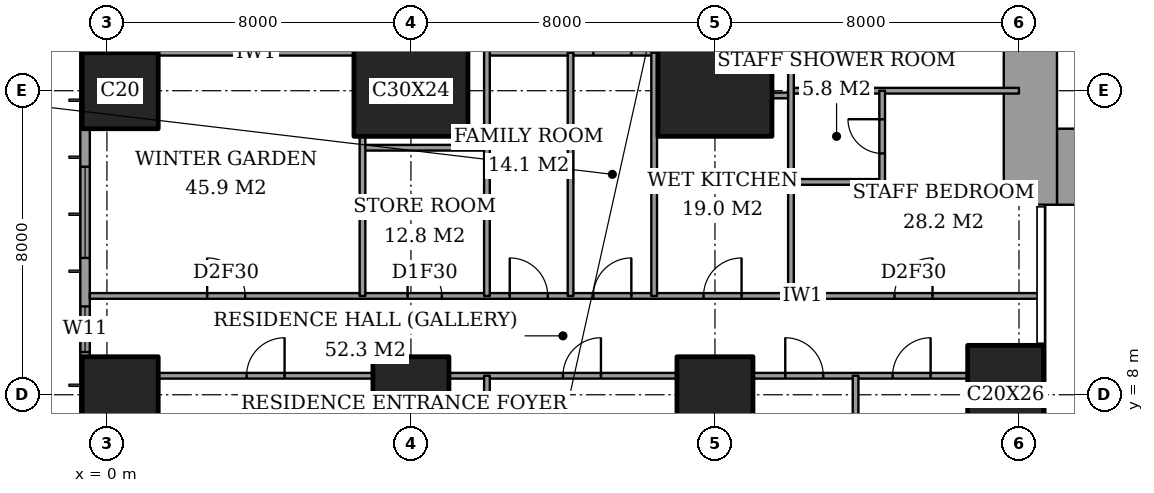
"""IFC4 building model, lengths in metres.
Left out: names, types, materials, properties, quantities, classifications, styles, units other than length and angle.
Written with IfcOpenShell. Run it as: python <this file> out.ifc"""

import sys

from ifc_helpers import new_model, si_unit, direction, frame, frame_2d, origin, origin_2d, place, context, subcontext, project, spatial, rectangle, extrude, element, fill, save


model = new_model("IFC4")
c1 = context("Model", 3, precision=1e-05, world=origin(), true_north=direction((0.0, 1.0)))
c2 = subcontext(c1, "Body", "Model", "MODEL_VIEW")
j1 = project(units=[si_unit("LENGTHUNIT", "METRE"), si_unit("PLANEANGLEUNIT", "RADIAN")], contexts=[c1])
p1 = place(None, origin())
s1 = spatial("IfcSite", under=j1, at=p1, CompositionType="ELEMENT")
p2 = place(p1, origin())
s2 = spatial("IfcBuilding", under=s1, at=p2, CompositionType="ELEMENT")
p3 = place(p2, frame((0.0, 0.0, 117.8)))
s3 = spatial("IfcBuildingStorey", under=s2, at=p3, CompositionType="ELEMENT", Elevation=117.8)
for number, where, z_axis, x_axis in (
    (1, (0.35, 8.0, 0.0), (0.0, 0.0, 1.0), (1.0, 0.0, 0.0)),
    (2, (0.35, 16.0, 0.0), (0.0, 0.0, 1.0), (1.0, 0.0, 0.0)),
    (3, (8.0, 8.0, 0.0), (0.0, 0.0, 1.0), (1.0, 0.0, 0.0)),
):
    element("IfcColumn", number, at=place(p3, frame(where, z_axis=z_axis, x_axis=x_axis)), inside=s3, PredefinedType="COLUMN", context=c2, shape_type="SweptSolid", body=[
        extrude(rectangle(XDim=2.0, YDim=2.0, at=origin_2d()), origin(), (0.0, 0.0, 1.0), 3.6),
    ])
p4 = place(p3, frame((8.0, 16.0, 0.0), z_axis=(0.0, 0.0, 1.0), x_axis=(1.0, 0.0, 0.0)))
e4 = element("IfcColumn", 4, at=p4, inside=s3, PredefinedType="COLUMN", context=c2, shape_type="SweptSolid", body=[
    extrude(rectangle(XDim=3.0, YDim=2.4, at=origin_2d()), origin(), (0.0, 0.0, 1.0), 3.6),
])
p5 = place(p3, frame((16.0, 8.0, 0.0), z_axis=(0.0, 0.0, 1.0), x_axis=(1.0, 0.0, 0.0)))
e5 = element("IfcColumn", 5, at=p5, inside=s3, PredefinedType="COLUMN", context=c2, shape_type="SweptSolid", body=[
    extrude(rectangle(XDim=2.0, YDim=2.0, at=origin_2d()), origin(), (0.0, 0.0, 1.0), 3.6),
])
p6 = place(p3, frame((16.0, 16.0, 0.0), z_axis=(0.0, 0.0, 1.0), x_axis=(1.0, 0.0, 0.0)))
e6 = element("IfcColumn", 6, at=p6, inside=s3, PredefinedType="COLUMN", context=c2, shape_type="SweptSolid", body=[
    extrude(rectangle(XDim=3.0, YDim=2.4, at=origin_2d()), origin(), (0.0, 0.0, 1.0), 3.6),
])
p7 = place(p3, frame((23.65, 8.0, 0.0), z_axis=(0.0, 0.0, 1.0), x_axis=(1.0, 0.0, 0.0)))
e7 = element("IfcColumn", 7, at=p7, inside=s3, PredefinedType="COLUMN", context=c2, shape_type="SweptSolid", body=[
    extrude(rectangle(XDim=2.0, YDim=2.6, at=origin_2d()), origin(), (0.0, 0.0, 1.0), 3.6),
])
p8 = place(p3, frame((25.0, 14.0, 0.0), z_axis=(0.0, 0.0, 1.0), x_axis=(1.0, 0.0, 0.0)))
e8 = element("IfcWall", 8, at=p8, inside=s3, PredefinedType="SHEAR", context=c2, shape_type="SweptSolid", body=[
    extrude(rectangle(XDim=3.15, YDim=2.0, at=frame_2d((1.575, 0.0))), origin(), (0.0, 0.0, 1.0), 3.6),
])
p9 = place(p3, frame((24.3, 13.0, 0.0), z_axis=(0.0, 0.0, 1.0), x_axis=(0.0, 1.0, 0.0)))
e9 = element("IfcWall", 9, at=p9, inside=s3, PredefinedType="SHEAR", context=c2, shape_type="SweptSolid", body=[
    extrude(rectangle(XDim=10.15, YDim=1.4, at=frame_2d((5.075, 0.0))), origin(), (0.0, 0.0, 1.0), 3.6),
])
p10 = place(p3, frame((-0.575, 44.825, 0.0), z_axis=(0.0, 0.0, 1.0), x_axis=(0.0, -1.0, 0.0)))
e10 = element("IfcWall", 10, at=p10, inside=s3, PredefinedType="SOLIDWALL", context=c2, shape_type="SweptSolid", body=[
    extrude(rectangle(XDim=41.65, YDim=0.25, at=frame_2d((20.825, 0.0))), origin(), (0.0, 0.0, 1.0), 3.6),
])
p11 = place(p10, frame((0.775, 0.0, 0.4)))
e11 = element("IfcOpeningElement", 11, at=p11, cuts=e10, PredefinedType="OPENING", context=c2, shape_type="SweptSolid", body=[
    extrude(rectangle(XDim=2.4, YDim=2.2, at=frame_2d((1.2, 1.1))), frame((0.0, 0.135, 0.0), z_axis=(0.0, -1.0, 0.0), x_axis=(1.0, 0.0, 0.0)), (0.0, 0.0, 1.0), 0.27),
])
p12 = place(p10, frame((6.1, 0.0, 0.4)))
e12 = element("IfcOpeningElement", 12, at=p12, cuts=e10, PredefinedType="OPENING", context=c2, shape_type="SweptSolid", body=[
    extrude(rectangle(XDim=1.2, YDim=2.2, at=frame_2d((0.6, 1.1))), frame((0.0, 0.135, 0.0), z_axis=(0.0, -1.0, 0.0), x_axis=(1.0, 0.0, 0.0)), (0.0, 0.0, 1.0), 0.27),
])
p13 = place(p10, frame((8.225, 0.0, 0.4)))
e13 = element("IfcOpeningElement", 13, at=p13, cuts=e10, PredefinedType="OPENING", context=c2, shape_type="SweptSolid", body=[
    extrude(rectangle(XDim=2.4, YDim=2.2, at=frame_2d((1.2, 1.1))), frame((0.0, 0.135, 0.0), z_axis=(0.0, -1.0, 0.0), x_axis=(1.0, 0.0, 0.0)), (0.0, 0.0, 1.0), 0.27),
])
p14 = place(p10, frame((15.625, 0.0, 0.4)))
e14 = element("IfcOpeningElement", 14, at=p14, cuts=e10, PredefinedType="OPENING", context=c2, shape_type="SweptSolid", body=[
    extrude(rectangle(XDim=2.4, YDim=2.2, at=frame_2d((1.2, 1.1))), frame((0.0, 0.135, 0.0), z_axis=(0.0, -1.0, 0.0), x_axis=(1.0, 0.0, 0.0)), (0.0, 0.0, 1.0), 0.27),
])
p15 = place(p10, frame((23.625, 0.0, 0.4)))
e15 = element("IfcOpeningElement", 15, at=p15, cuts=e10, PredefinedType="OPENING", context=c2, shape_type="SweptSolid", body=[
    extrude(rectangle(XDim=2.4, YDim=2.2, at=frame_2d((1.2, 1.1))), frame((0.0, 0.135, 0.0), z_axis=(0.0, -1.0, 0.0), x_axis=(1.0, 0.0, 0.0)), (0.0, 0.0, 1.0), 0.27),
])
p16 = place(p10, frame((30.825, 0.0, 0.4)))
e16 = element("IfcOpeningElement", 16, at=p16, cuts=e10, PredefinedType="OPENING", context=c2, shape_type="SweptSolid", body=[
    extrude(rectangle(XDim=2.4, YDim=2.2, at=frame_2d((1.2, 1.1))), frame((0.0, 0.135, 0.0), z_axis=(0.0, -1.0, 0.0), x_axis=(1.0, 0.0, 0.0)), (0.0, 0.0, 1.0), 0.27),
])
p17 = place(p10, frame((34.5, 0.0, 0.4)))
e17 = element("IfcOpeningElement", 17, at=p17, cuts=e10, PredefinedType="OPENING", context=c2, shape_type="SweptSolid", body=[
    extrude(rectangle(XDim=1.2, YDim=2.2, at=frame_2d((0.6, 1.1))), frame((0.0, 0.135, 0.0), z_axis=(0.0, -1.0, 0.0), x_axis=(1.0, 0.0, 0.0)), (0.0, 0.0, 1.0), 0.27),
])
p18 = place(p10, frame((38.475, 0.0, 0.4)))
e18 = element("IfcOpeningElement", 18, at=p18, cuts=e10, PredefinedType="OPENING", context=c2, shape_type="SweptSolid", body=[
    extrude(rectangle(XDim=2.4, YDim=2.2, at=frame_2d((1.2, 1.1))), frame((0.0, 0.135, 0.0), z_axis=(0.0, -1.0, 0.0), x_axis=(1.0, 0.0, 0.0)), (0.0, 0.0, 1.0), 0.27),
])
p19 = place(p3, frame((1.35, 8.5, 0.0), z_axis=(0.0, 0.0, 1.0), x_axis=(1.0, 0.0, 0.0)))
e19 = element("IfcWall", 19, at=p19, inside=s3, PredefinedType="PARTITIONING", context=c2, shape_type="SweptSolid", body=[
    extrude(rectangle(XDim=5.65, YDim=0.15, at=frame_2d((2.825, 0.0))), origin(), (0.0, 0.0, 1.0), 3.35),
])
p20 = place(p19, frame((2.325, 0.0, 0.0)))
e20 = element("IfcOpeningElement", 20, at=p20, cuts=e19, PredefinedType="OPENING", context=c2, shape_type="SweptSolid", body=[
    extrude(rectangle(XDim=1.0, YDim=2.1, at=frame_2d((0.5, 1.05))), frame((0.0, 0.085, 0.0), z_axis=(0.0, -1.0, 0.0), x_axis=(1.0, 0.0, 0.0)), (0.0, 0.0, 1.0), 0.17),
])
p21 = place(p3, frame((9.0, 8.5, 0.0), z_axis=(0.0, 0.0, 1.0), x_axis=(1.0, 0.0, 0.0)))
e21 = element("IfcWall", 21, at=p21, inside=s3, PredefinedType="PARTITIONING", context=c2, shape_type="SweptSolid", body=[
    extrude(rectangle(XDim=6.0, YDim=0.15, at=frame_2d((3.0, 0.0))), origin(), (0.0, 0.0, 1.0), 3.35),
])
p22 = place(p21, frame((3.0, 0.0, 0.0)))
e22 = element("IfcOpeningElement", 22, at=p22, cuts=e21, PredefinedType="OPENING", context=c2, shape_type="SweptSolid", body=[
    extrude(rectangle(XDim=1.0, YDim=2.1, at=frame_2d((0.5, 1.05))), frame((0.0, 0.085, 0.0), z_axis=(0.0, -1.0, 0.0), x_axis=(1.0, 0.0, 0.0)), (0.0, 0.0, 1.0), 0.17),
])
p23 = place(p3, frame((17.0, 8.5, 0.0), z_axis=(0.0, 0.0, 1.0), x_axis=(1.0, 0.0, 0.0)))
e23 = element("IfcWall", 23, at=p23, inside=s3, PredefinedType="PARTITIONING", context=c2, shape_type="SweptSolid", body=[
    extrude(rectangle(XDim=5.65, YDim=0.15, at=frame_2d((2.825, 0.0))), origin(), (0.0, 0.0, 1.0), 3.35),
])
p24 = place(p23, frame((0.85, 0.0, 0.0)))
e24 = element("IfcOpeningElement", 24, at=p24, cuts=e23, PredefinedType="OPENING", context=c2, shape_type="SweptSolid", body=[
    extrude(rectangle(XDim=1.0, YDim=2.1, at=frame_2d((0.5, 1.05))), frame((0.0, 0.085, 0.0), z_axis=(0.0, -1.0, 0.0), x_axis=(1.0, 0.0, 0.0)), (0.0, 0.0, 1.0), 0.17),
])
p25 = place(p23, frame((3.675, 0.0, 0.0)))
e25 = element("IfcOpeningElement", 25, at=p25, cuts=e23, PredefinedType="OPENING", context=c2, shape_type="SweptSolid", body=[
    extrude(rectangle(XDim=1.0, YDim=2.1, at=frame_2d((0.5, 1.05))), frame((0.0, 0.085, 0.0), z_axis=(0.0, -1.0, 0.0), x_axis=(1.0, 0.0, 0.0)), (0.0, 0.0, 1.0), 0.17),
])
p26 = place(p3, frame((-0.45, 10.6, 0.0), z_axis=(0.0, 0.0, 1.0), x_axis=(1.0, 0.0, 0.0)))
e26 = element("IfcWall", 26, at=p26, inside=s3, PredefinedType="PARTITIONING", context=c2, shape_type="SweptSolid", body=[
    extrude(rectangle(XDim=25.011, YDim=0.15, at=frame_2d((12.505, 0.0))), origin(), (0.0, 0.0, 1.0), 3.35),
])
p27 = place(p26, frame((13.25, 0.0, 0.0)))
e27 = element("IfcOpeningElement", 27, at=p27, cuts=e26, PredefinedType="OPENING", context=c2, shape_type="SweptSolid", body=[
    extrude(rectangle(XDim=1.0, YDim=2.1, at=frame_2d((0.5, 1.05))), frame((0.0, 0.085, 0.0), z_axis=(0.0, -1.0, 0.0), x_axis=(1.0, 0.0, 0.0)), (0.0, 0.0, 1.0), 0.17),
])
p28 = place(p26, frame((3.087, 0.0, 0.0)))
e28 = element("IfcOpeningElement", 28, at=p28, cuts=e26, PredefinedType="OPENING", context=c2, shape_type="SweptSolid", body=[
    extrude(rectangle(XDim=1.0, YDim=2.1, at=frame_2d((0.5, 1.05))), frame((0.0, 0.085, 0.0), z_axis=(0.0, -1.0, 0.0), x_axis=(1.0, 0.0, 0.0)), (0.0, 0.0, 1.0), 0.17),
])
p29 = place(p26, frame((8.363, 0.0, 0.0)))
e29 = element("IfcOpeningElement", 29, at=p29, cuts=e26, PredefinedType="OPENING", context=c2, shape_type="SweptSolid", body=[
    extrude(rectangle(XDim=0.9, YDim=2.1, at=frame_2d((0.45, 1.05))), frame((0.0, 0.085, 0.0), z_axis=(0.0, -1.0, 0.0), x_axis=(1.0, 0.0, 0.0)), (0.0, 0.0, 1.0), 0.17),
])
p30 = place(p26, frame((11.05, 0.0, 0.0)))
e30 = element("IfcOpeningElement", 30, at=p30, cuts=e26, PredefinedType="OPENING", context=c2, shape_type="SweptSolid", body=[
    extrude(rectangle(XDim=1.0, YDim=2.1, at=frame_2d((0.5, 1.05))), frame((0.0, 0.085, 0.0), z_axis=(0.0, -1.0, 0.0), x_axis=(1.0, 0.0, 0.0)), (0.0, 0.0, 1.0), 0.17),
])
p31 = place(p26, frame((16.15, 0.0, 0.0)))
e31 = element("IfcOpeningElement", 31, at=p31, cuts=e26, PredefinedType="OPENING", context=c2, shape_type="SweptSolid", body=[
    extrude(rectangle(XDim=1.0, YDim=2.1, at=frame_2d((0.5, 1.05))), frame((0.0, 0.085, 0.0), z_axis=(0.0, -1.0, 0.0), x_axis=(1.0, 0.0, 0.0)), (0.0, 0.0, 1.0), 0.17),
])
p32 = place(p26, frame((21.175, 0.0, 0.0)))
e32 = element("IfcOpeningElement", 32, at=p32, cuts=e26, PredefinedType="OPENING", context=c2, shape_type="SweptSolid", body=[
    extrude(rectangle(XDim=1.0, YDim=2.1, at=frame_2d((0.5, 1.05))), frame((0.0, 0.085, 0.0), z_axis=(0.0, -1.0, 0.0), x_axis=(1.0, 0.0, 0.0)), (0.0, 0.0, 1.0), 0.17),
])
p33 = place(p3, frame((18.0, 13.6, 0.0), z_axis=(0.0, 0.0, 1.0), x_axis=(1.0, 0.0, 0.0)))
e33 = element("IfcWall", 33, at=p33, inside=s3, PredefinedType="PARTITIONING", context=c2, shape_type="SweptSolid", body=[
    extrude(rectangle(XDim=2.4, YDim=0.15, at=frame_2d((1.2, 0.0))), origin(), (0.0, 0.0, 1.0), 3.35),
])
p34 = place(p3, frame((6.725, 14.5, 0.0), z_axis=(0.0, 0.0, 1.0), x_axis=(1.0, 0.0, 0.0)))
e34 = element("IfcWall", 34, at=p34, inside=s3, PredefinedType="PARTITIONING", context=c2, shape_type="SweptSolid", body=[
    extrude(rectangle(XDim=3.275, YDim=0.15, at=frame_2d((1.637, 0.0))), origin(), (0.0, 0.0, 1.0), 3.35),
])
p35 = place(p3, frame((17.5, 15.875, 0.0), z_axis=(0.0, 0.0, 1.0), x_axis=(1.0, 0.0, 0.0)))
e35 = element("IfcWall", 35, at=p35, inside=s3, PredefinedType="PARTITIONING", context=c2, shape_type="SweptSolid", body=[
    extrude(rectangle(XDim=0.5, YDim=0.15, at=frame_2d((0.25, 0.0))), origin(), (0.0, 0.0, 1.0), 2.634),
])
p36 = place(p3, frame((18.0, 16.0, 0.0), z_axis=(0.0, 0.0, 1.0), x_axis=(1.0, 0.0, 0.0)))
e36 = element("IfcWall", 36, at=p36, inside=s3, PredefinedType="PARTITIONING", context=c2, shape_type="SweptSolid", body=[
    extrude(rectangle(XDim=6.0, YDim=0.15, at=frame_2d((3.0, 0.0))), origin(), (0.0, 0.0, 1.0), 2.634),
])
p37 = place(p3, frame((1.35, 17.0, 0.0), z_axis=(0.0, 0.0, 1.0), x_axis=(1.0, 0.0, 0.0)))
e37 = element("IfcWall", 37, at=p37, inside=s3, PredefinedType="PARTITIONING", context=c2, shape_type="SweptSolid", body=[
    extrude(rectangle(XDim=5.15, YDim=0.15, at=frame_2d((2.575, 0.0))), origin(), (0.0, 0.0, 1.0), 3.35),
])
p38 = place(p3, frame((10.0, 17.0, 0.0), z_axis=(0.0, 0.0, 1.0), x_axis=(1.0, 0.0, 0.0)))
e38 = element("IfcWall", 38, at=p38, inside=s3, PredefinedType="PARTITIONING", context=c2, shape_type="SweptSolid", body=[
    extrude(rectangle(XDim=4.4, YDim=0.15, at=frame_2d((2.2, 0.0))), origin(), (0.0, 0.0, 1.0), 3.35),
])
p39 = place(p38, frame((2.8, 0.0, 0.0)))
e39 = element("IfcOpeningElement", 39, at=p39, cuts=e38, PredefinedType="OPENING", context=c2, shape_type="SweptSolid", body=[
    extrude(rectangle(XDim=1.0, YDim=2.1, at=frame_2d((0.5, 1.05))), frame((0.0, 0.085, 0.0), z_axis=(0.0, -1.0, 0.0), x_axis=(1.0, 0.0, 0.0)), (0.0, 0.0, 1.0), 0.17),
])
p40 = place(p3, frame((6.725, 10.6, 0.0), z_axis=(0.0, 0.0, 1.0), x_axis=(0.0, 1.0, 0.0)))
e40 = element("IfcWall", 40, at=p40, inside=s3, PredefinedType="PARTITIONING", context=c2, shape_type="SweptSolid", body=[
    extrude(rectangle(XDim=4.2, YDim=0.15, at=frame_2d((2.1, 0.0))), origin(), (0.0, 0.0, 1.0), 3.35),
])
p41 = place(p3, frame((10.0, -0.45, 0.0), z_axis=(0.0, 0.0, 1.0), x_axis=(0.0, 1.0, 0.0)))
e41 = element("IfcWall", 41, at=p41, inside=s3, PredefinedType="PARTITIONING", context=c2, shape_type="SweptSolid", body=[
    extrude(rectangle(XDim=8.95, YDim=0.15, at=frame_2d((4.475, 0.0))), origin(), (0.0, 0.0, 1.0), 3.35),
])
p42 = place(p3, frame((10.0, 10.6, 0.0), z_axis=(0.0, 0.0, 1.0), x_axis=(0.0, 1.0, 0.0)))
e42 = element("IfcWall", 42, at=p42, inside=s3, PredefinedType="PARTITIONING", context=c2, shape_type="SweptSolid", body=[
    extrude(rectangle(XDim=11.0, YDim=0.15, at=frame_2d((5.5, 0.0))), origin(), (0.0, 0.0, 1.0), 3.35),
])
p43 = place(p42, frame((8.2, 0.0, 0.0)))
e43 = element("IfcOpeningElement", 43, at=p43, cuts=e42, PredefinedType="OPENING", context=c2, shape_type="SweptSolid", body=[
    extrude(rectangle(XDim=1.0, YDim=2.1, at=frame_2d((0.5, 1.05))), frame((0.0, 0.085, 0.0), z_axis=(0.0, -1.0, 0.0), x_axis=(1.0, 0.0, 0.0)), (0.0, 0.0, 1.0), 0.17),
])
for number, where, z_axis, x_axis in (
    (44, (12.2, 10.6, 0.0), (0.0, 0.0, 1.0), (0.0, 1.0, 0.0)),
    (45, (14.4, 10.6, 0.0), (0.0, 0.0, 1.0), (0.0, 1.0, 0.0)),
    (46, (18.0, 10.6, 0.0), (0.0, 0.0, 1.0), (0.0, 1.0, 0.0)),
):
    element("IfcWall", number, at=place(p3, frame(where, z_axis=z_axis, x_axis=x_axis)), inside=s3, PredefinedType="PARTITIONING", context=c2, shape_type="SweptSolid", body=[
        extrude(rectangle(XDim=6.4, YDim=0.15, at=frame_2d((3.2, 0.0))), origin(), (0.0, 0.0, 1.0), 3.35),
    ])
p44 = place(p3, frame((19.7, -0.45, 0.0), z_axis=(0.0, 0.0, 1.0), x_axis=(0.0, 1.0, 0.0)))
e47 = element("IfcWall", 47, at=p44, inside=s3, PredefinedType="PARTITIONING", context=c2, shape_type="SweptSolid", body=[
    extrude(rectangle(XDim=8.95, YDim=0.15, at=frame_2d((4.475, 0.0))), origin(), (0.0, 0.0, 1.0), 3.35),
])
p45 = place(p3, frame((20.4, 13.6, 0.0), z_axis=(0.0, 0.0, 1.0), x_axis=(0.0, 1.0, 0.0)))
e48 = element("IfcWall", 48, at=p45, inside=s3, PredefinedType="PARTITIONING", context=c2, shape_type="SweptSolid", body=[
    extrude(rectangle(XDim=2.4, YDim=0.15, at=frame_2d((1.2, 0.0))), origin(), (0.0, 0.0, 1.0), 3.35),
])
p46 = place(p45, frame((0.75, 0.0, 0.0)))
e49 = element("IfcOpeningElement", 49, at=p46, cuts=e48, PredefinedType="OPENING", context=c2, shape_type="SweptSolid", body=[
    extrude(rectangle(XDim=0.9, YDim=2.1, at=frame_2d((0.45, 1.05))), frame((0.0, 0.085, 0.0), z_axis=(0.0, -1.0, 0.0), x_axis=(1.0, 0.0, 0.0)), (0.0, 0.0, 1.0), 0.17),
])
p47 = place(p16, origin())
e50 = element("IfcWindow", 50, at=p47, inside=s3, PartitioningType="SINGLE_PANEL", PredefinedType="WINDOW", context=c2, shape_type="SweptSolid", body=[
    extrude(rectangle(XDim=2.4, YDim=2.2, at=frame_2d((1.2, 1.1))), frame((0.0, 0.03, 0.0), z_axis=(0.0, -1.0, 0.0), x_axis=(1.0, 0.0, 0.0)), (0.0, 0.0, 1.0), 0.06),
])
fill(e16, e50)
p48 = place(p17, origin())
e51 = element("IfcWindow", 51, at=p48, inside=s3, PartitioningType="SINGLE_PANEL", PredefinedType="WINDOW", context=c2, shape_type="SweptSolid", body=[
    extrude(rectangle(XDim=1.2, YDim=2.2, at=frame_2d((0.6, 1.1))), frame((0.0, 0.03, 0.0), z_axis=(0.0, -1.0, 0.0), x_axis=(1.0, 0.0, 0.0)), (0.0, 0.0, 1.0), 0.06),
])
fill(e17, e51)
p49 = place(p20, origin())
e52 = element("IfcDoor", 52, at=p49, inside=s3, OperationType="SINGLE_SWING_LEFT", PredefinedType="DOOR", context=c2, shape_type="SweptSolid", body=[
    extrude(rectangle(XDim=1.0, YDim=2.1, at=frame_2d((0.5, 1.05))), frame((0.0, 0.025, 0.0), z_axis=(0.0, -1.0, 0.0), x_axis=(1.0, 0.0, 0.0)), (0.0, 0.0, 1.0), 0.05),
])
fill(e20, e52)
p50 = place(p22, origin())
e53 = element("IfcDoor", 53, at=p50, inside=s3, OperationType="SINGLE_SWING_LEFT", PredefinedType="DOOR", context=c2, shape_type="SweptSolid", body=[
    extrude(rectangle(XDim=1.0, YDim=2.1, at=frame_2d((0.5, 1.05))), frame((0.0, 0.025, 0.0), z_axis=(0.0, -1.0, 0.0), x_axis=(1.0, 0.0, 0.0)), (0.0, 0.0, 1.0), 0.05),
])
fill(e22, e53)
p51 = place(p24, origin())
e54 = element("IfcDoor", 54, at=p51, inside=s3, OperationType="SINGLE_SWING_RIGHT", PredefinedType="DOOR", context=c2, shape_type="SweptSolid", body=[
    extrude(rectangle(XDim=1.0, YDim=2.1, at=frame_2d((0.5, 1.05))), frame((0.0, 0.025, 0.0), z_axis=(0.0, -1.0, 0.0), x_axis=(1.0, 0.0, 0.0)), (0.0, 0.0, 1.0), 0.05),
])
fill(e24, e54)
p52 = place(p25, origin())
e55 = element("IfcDoor", 55, at=p52, inside=s3, OperationType="SINGLE_SWING_LEFT", PredefinedType="DOOR", context=c2, shape_type="SweptSolid", body=[
    extrude(rectangle(XDim=1.0, YDim=2.1, at=frame_2d((0.5, 1.05))), frame((0.0, 0.025, 0.0), z_axis=(0.0, -1.0, 0.0), x_axis=(1.0, 0.0, 0.0)), (0.0, 0.0, 1.0), 0.05),
])
fill(e25, e55)
p53 = place(p27, origin())
e56 = element("IfcDoor", 56, at=p53, inside=s3, OperationType="SINGLE_SWING_LEFT", PredefinedType="DOOR", context=c2, shape_type="SweptSolid", body=[
    extrude(rectangle(XDim=1.0, YDim=2.1, at=frame_2d((0.5, 1.05))), frame((0.0, 0.025, 0.0), z_axis=(0.0, -1.0, 0.0), x_axis=(1.0, 0.0, 0.0)), (0.0, 0.0, 1.0), 0.05),
])
fill(e27, e56)
p54 = place(p28, origin())
e57 = element("IfcDoor", 57, at=p54, inside=s3, OperationType="SINGLE_SWING_RIGHT", PredefinedType="DOOR", context=c2, shape_type="SweptSolid", body=[
    extrude(rectangle(XDim=1.0, YDim=2.1, at=frame_2d((0.5, 1.05))), frame((0.0, 0.025, 0.0), z_axis=(0.0, -1.0, 0.0), x_axis=(1.0, 0.0, 0.0)), (0.0, 0.0, 1.0), 0.05),
])
fill(e28, e57)
p55 = place(p29, origin())
e58 = element("IfcDoor", 58, at=p55, inside=s3, OperationType="SINGLE_SWING_RIGHT", PredefinedType="DOOR", context=c2, shape_type="SweptSolid", body=[
    extrude(rectangle(XDim=0.9, YDim=2.1, at=frame_2d((0.45, 1.05))), frame((0.0, 0.025, 0.0), z_axis=(0.0, -1.0, 0.0), x_axis=(1.0, 0.0, 0.0)), (0.0, 0.0, 1.0), 0.05),
])
fill(e29, e58)
p56 = place(p30, origin())
e59 = element("IfcDoor", 59, at=p56, inside=s3, OperationType="SINGLE_SWING_RIGHT", PredefinedType="DOOR", context=c2, shape_type="SweptSolid", body=[
    extrude(rectangle(XDim=1.0, YDim=2.1, at=frame_2d((0.5, 1.05))), frame((0.0, 0.025, 0.0), z_axis=(0.0, -1.0, 0.0), x_axis=(1.0, 0.0, 0.0)), (0.0, 0.0, 1.0), 0.05),
])
fill(e30, e59)
p57 = place(p39, origin())
e60 = element("IfcDoor", 60, at=p57, inside=s3, OperationType="SINGLE_SWING_LEFT", PredefinedType="DOOR", context=c2, shape_type="SweptSolid", body=[
    extrude(rectangle(XDim=1.0, YDim=2.1, at=frame_2d((0.5, 1.05))), frame((0.0, 0.025, 0.0), z_axis=(0.0, -1.0, 0.0), x_axis=(1.0, 0.0, 0.0)), (0.0, 0.0, 1.0), 0.05),
])
fill(e39, e60)
p58 = place(p31, origin())
e61 = element("IfcDoor", 61, at=p58, inside=s3, OperationType="SINGLE_SWING_LEFT", PredefinedType="DOOR", context=c2, shape_type="SweptSolid", body=[
    extrude(rectangle(XDim=1.0, YDim=2.1, at=frame_2d((0.5, 1.05))), frame((0.0, 0.025, 0.0), z_axis=(0.0, -1.0, 0.0), x_axis=(1.0, 0.0, 0.0)), (0.0, 0.0, 1.0), 0.05),
])
fill(e31, e61)
p59 = place(p46, origin())
e62 = element("IfcDoor", 62, at=p59, inside=s3, OperationType="SINGLE_SWING_LEFT", PredefinedType="DOOR", context=c2, shape_type="SweptSolid", body=[
    extrude(rectangle(XDim=0.9, YDim=2.1, at=frame_2d((0.45, 1.05))), frame((0.0, 0.025, 0.0), z_axis=(0.0, -1.0, 0.0), x_axis=(1.0, 0.0, 0.0)), (0.0, 0.0, 1.0), 0.05),
])
fill(e49, e62)
p60 = place(p32, origin())
e63 = element("IfcDoor", 63, at=p60, inside=s3, OperationType="SINGLE_SWING_LEFT", PredefinedType="DOOR", context=c2, shape_type="SweptSolid", body=[
    extrude(rectangle(XDim=1.0, YDim=2.1, at=frame_2d((0.5, 1.05))), frame((0.0, 0.025, 0.0), z_axis=(0.0, -1.0, 0.0), x_axis=(1.0, 0.0, 0.0)), (0.0, 0.0, 1.0), 0.05),
])
fill(e32, e63)
save(model, sys.argv[1])
